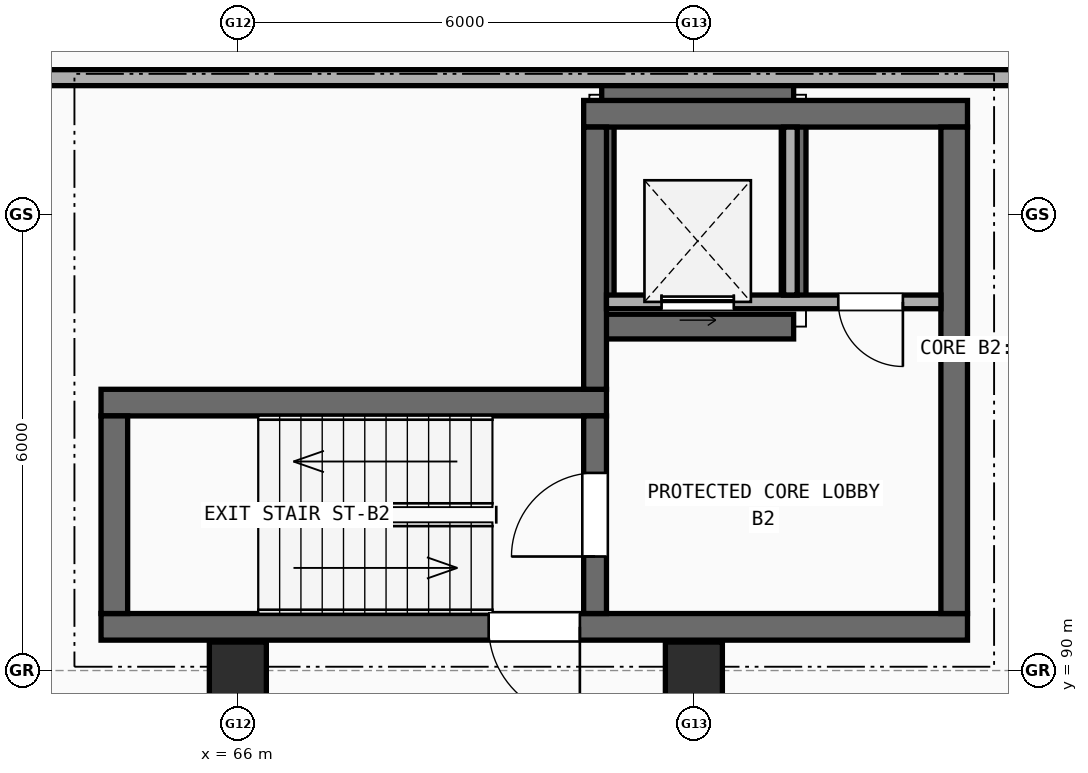
"""IFC4 building model, lengths in metres.
Left out: names, types, materials, properties, quantities, classifications, styles, units other than length and angle.
Written with IfcOpenShell. Run it as: python <this file> out.ifc"""

import sys

from ifc_helpers import new_model, si_unit, direction, frame, frame_2d, origin, origin_2d, place, context, subcontext, project, spatial, rectangle, extrude, element, fill, save


model = new_model("IFC4")
c1 = context("Model", 3, precision=1e-05, world=origin(), true_north=direction((0.0, 1.0)))
c2 = subcontext(c1, "Body", "Model", "MODEL_VIEW")
j1 = project(units=[si_unit("LENGTHUNIT", "METRE"), si_unit("PLANEANGLEUNIT", "RADIAN")], contexts=[c1])
p1 = place(None, origin())
s1 = spatial("IfcSite", under=j1, at=p1, CompositionType="ELEMENT")
p2 = place(p1, origin())
s2 = spatial("IfcBuilding", under=s1, at=p2, CompositionType="ELEMENT")
p3 = place(p2, frame((0.0, 0.0, -4.5)))
s3 = spatial("IfcBuildingStorey", under=s2, at=p3, CompositionType="ELEMENT", Elevation=-4.5)
p4 = place(p3, frame((70.788, 94.525, -1.1), z_axis=(0.0, 0.0, 1.0), x_axis=(1.0, 0.0, 0.0)))
e1 = element("IfcWall", 1, at=p4, inside=s3, PredefinedType="SHEAR", context=c2, shape_type="SweptSolid", body=[
    extrude(rectangle(XDim=2.525, YDim=0.325, at=frame_2d((1.262, 0.0))), origin(), (0.0, 0.0, 1.0), 1.1),
])
p5 = place(p3, frame((73.312, 94.85, -1.1), z_axis=(0.0, 0.0, 1.0), x_axis=(0.0, 1.0, 0.0)))
e2 = element("IfcWall", 2, at=p5, inside=s3, PredefinedType="SHEAR", context=c2, shape_type="SweptSolid", body=[
    extrude(rectangle(XDim=2.4, YDim=0.325, at=frame_2d((1.2, 0.0))), origin(), (0.0, 0.0, 1.0), 1.1),
])
p6 = place(p3, frame((73.312, 97.575, -1.1), z_axis=(0.0, 0.0, 1.0), x_axis=(-1.0, 0.0, 0.0)))
e3 = element("IfcWall", 3, at=p6, inside=s3, PredefinedType="SHEAR", context=c2, shape_type="SweptSolid", body=[
    extrude(rectangle(XDim=2.525, YDim=0.325, at=frame_2d((1.262, 0.0))), origin(), (0.0, 0.0, 1.0), 1.1),
])
p7 = place(p3, frame((70.788, 97.25, -1.1), z_axis=(0.0, 0.0, 1.0), x_axis=(0.0, -1.0, 0.0)))
e4 = element("IfcWall", 4, at=p7, inside=s3, PredefinedType="SHEAR", context=c2, shape_type="SweptSolid", body=[
    extrude(rectangle(XDim=2.4, YDim=0.325, at=frame_2d((1.2, 0.0))), origin(), (0.0, 0.0, 1.0), 1.1),
])
for number, where, z_axis, x_axis in (
    (5, (66.0, 90.0, 0.0), (0.0, 0.0, 1.0), (1.0, 0.0, 0.0)),
    (6, (72.0, 90.0, 0.0), (0.0, 0.0, 1.0), (1.0, 0.0, 0.0)),
):
    element("IfcColumn", number, at=place(p3, frame(where, z_axis=z_axis, x_axis=x_axis)), inside=s3, PredefinedType="COLUMN", context=c2, shape_type="SweptSolid", body=[
        extrude(rectangle(XDim=0.75, YDim=0.75, at=origin_2d()), origin(), (0.0, 0.0, 1.0), 4.215),
    ])
p8 = place(p3, frame((64.2, 90.575, 0.0), z_axis=(0.0, 0.0, 1.0), x_axis=(1.0, 0.0, 0.0)))
e7 = element("IfcWall", 7, at=p8, inside=s3, PredefinedType="SHEAR", context=c2, shape_type="SweptSolid", body=[
    extrude(rectangle(XDim=11.4, YDim=0.35, at=frame_2d((5.7, 0.0))), origin(), (0.0, 0.0, 1.0), 4.215),
])
p9 = place(p8, frame((5.1, 0.0, 0.0)))
e8 = element("IfcOpeningElement", 8, at=p9, cuts=e7, PredefinedType="OPENING", context=c2, shape_type="SweptSolid", body=[
    extrude(rectangle(XDim=1.2, YDim=2.15, at=frame_2d((0.6, 1.075))), frame((0.0, 0.185, 0.0), z_axis=(0.0, -1.0, 0.0), x_axis=(1.0, 0.0, 0.0)), (0.0, 0.0, 1.0), 0.37),
])
p10 = place(p3, frame((70.85, 93.525, 0.0), z_axis=(0.0, 0.0, 1.0), x_axis=(-1.0, 0.0, 0.0)))
e9 = element("IfcWall", 9, at=p10, inside=s3, PredefinedType="SHEAR", context=c2, shape_type="SweptSolid", body=[
    extrude(rectangle(XDim=6.65, YDim=0.35, at=frame_2d((3.325, 0.0))), origin(), (0.0, 0.0, 1.0), 4.215),
])
p11 = place(p3, frame((64.375, 93.35, 0.0), z_axis=(0.0, 0.0, 1.0), x_axis=(0.0, -1.0, 0.0)))
e10 = element("IfcWall", 10, at=p11, inside=s3, PredefinedType="SHEAR", context=c2, shape_type="SweptSolid", body=[
    extrude(rectangle(XDim=2.6, YDim=0.35, at=frame_2d((1.3, 0.0))), origin(), (0.0, 0.0, 1.0), 4.215),
])
p12 = place(p3, frame((70.7, 90.75, 0.0), z_axis=(0.0, 0.0, 1.0), x_axis=(0.0, 1.0, 0.0)))
e11 = element("IfcWall", 11, at=p12, inside=s3, PredefinedType="SHEAR", context=c2, shape_type="SweptSolid", body=[
    extrude(rectangle(XDim=2.6, YDim=0.3, at=frame_2d((1.3, 0.0))), origin(), (0.0, 0.0, 1.0), 4.215),
])
p13 = place(p12, frame((0.75, 0.0, 0.0)))
e12 = element("IfcOpeningElement", 12, at=p13, cuts=e11, PredefinedType="OPENING", context=c2, shape_type="SweptSolid", body=[
    extrude(rectangle(XDim=1.1, YDim=2.15, at=frame_2d((0.55, 1.075))), frame((0.0, 0.16, 0.0), z_axis=(0.0, -1.0, 0.0), x_axis=(1.0, 0.0, 0.0)), (0.0, 0.0, 1.0), 0.32),
])
p14 = place(p3, frame((75.6, 97.325, 0.0), z_axis=(0.0, 0.0, 1.0), x_axis=(-1.0, 0.0, 0.0)))
e13 = element("IfcWall", 13, at=p14, inside=s3, PredefinedType="SHEAR", context=c2, shape_type="SweptSolid", body=[
    extrude(rectangle(XDim=5.05, YDim=0.35, at=frame_2d((2.525, 0.0))), origin(), (0.0, 0.0, 1.0), 4.215),
])
p15 = place(p3, frame((75.425, 90.75, 0.0), z_axis=(0.0, 0.0, 1.0), x_axis=(0.0, 1.0, 0.0)))
e14 = element("IfcWall", 14, at=p15, inside=s3, PredefinedType="SHEAR", context=c2, shape_type="SweptSolid", body=[
    extrude(rectangle(XDim=6.4, YDim=0.35, at=frame_2d((3.2, 0.0))), origin(), (0.0, 0.0, 1.0), 4.215),
])
p16 = place(p3, frame((70.7, 93.7, 0.0), z_axis=(0.0, 0.0, 1.0), x_axis=(0.0, 1.0, 0.0)))
e15 = element("IfcWall", 15, at=p16, inside=s3, PredefinedType="SHEAR", context=c2, shape_type="SweptSolid", body=[
    extrude(rectangle(XDim=3.45, YDim=0.3, at=frame_2d((1.725, 0.0))), origin(), (0.0, 0.0, 1.0), 4.215),
])
p17 = place(p3, frame((70.85, 94.85, 0.0), z_axis=(0.0, 0.0, 1.0), x_axis=(1.0, 0.0, 0.0)))
e16 = element("IfcWall", 16, at=p17, inside=s3, PredefinedType="SOLIDWALL", context=c2, shape_type="SweptSolid", body=[
    extrude(rectangle(XDim=4.4, YDim=0.18, at=frame_2d((2.2, 0.0))), origin(), (0.0, 0.0, 1.0), 4.215),
])
p18 = place(p17, frame((0.725, 0.0, 0.0)))
e17 = element("IfcOpeningElement", 17, at=p18, cuts=e16, PredefinedType="OPENING", context=c2, shape_type="SweptSolid", body=[
    extrude(rectangle(XDim=0.95, YDim=2.15, at=frame_2d((0.475, 1.075))), frame((0.0, 0.1, 0.0), z_axis=(0.0, -1.0, 0.0), x_axis=(1.0, 0.0, 0.0)), (0.0, 0.0, 1.0), 0.2),
])
p19 = place(p17, frame((3.05, 0.0, 0.0)))
e18 = element("IfcOpeningElement", 18, at=p19, cuts=e16, PredefinedType="OPENING", context=c2, shape_type="SweptSolid", body=[
    extrude(rectangle(XDim=0.85, YDim=2.1, at=frame_2d((0.425, 1.05))), frame((0.0, 0.1, 0.0), z_axis=(0.0, -1.0, 0.0), x_axis=(1.0, 0.0, 0.0)), (0.0, 0.0, 1.0), 0.2),
])
p20 = place(p3, frame((73.27, 94.94, 0.0), z_axis=(0.0, 0.0, 1.0), x_axis=(0.0, 1.0, 0.0)))
e19 = element("IfcWall", 19, at=p20, inside=s3, PredefinedType="SOLIDWALL", context=c2, shape_type="SweptSolid", body=[
    extrude(rectangle(XDim=2.21, YDim=0.18, at=frame_2d((1.105, 0.0))), origin(), (0.0, 0.0, 1.0), 4.215),
])
p21 = place(p3, frame((50.14, 97.8, 0.0), z_axis=(0.0, 0.0, 1.0), x_axis=(1.0, 0.0, 0.0)))
e20 = element("IfcWall", 20, at=p21, inside=s3, PredefinedType="SOLIDWALL", context=c2, shape_type="SweptSolid", body=[
    extrude(rectangle(XDim=32.32, YDim=0.21, at=frame_2d((16.16, 0.0))), origin(), (0.0, 0.0, 1.0), 2.897),
])
p22 = place(p9, origin())
e21 = element("IfcDoor", 21, at=p22, inside=s3, OperationType="SINGLE_SWING_RIGHT", PredefinedType="DOOR", context=c2, shape_type="SweptSolid", body=[
    extrude(rectangle(XDim=1.2, YDim=2.15, at=frame_2d((0.6, 1.075))), frame((0.0, 0.025, 0.0), z_axis=(0.0, -1.0, 0.0), x_axis=(1.0, 0.0, 0.0)), (0.0, 0.0, 1.0), 0.05),
])
fill(e8, e21)
p23 = place(p13, origin())
e22 = element("IfcDoor", 22, at=p23, inside=s3, OperationType="SINGLE_SWING_LEFT", PredefinedType="DOOR", context=c2, shape_type="SweptSolid", body=[
    extrude(rectangle(XDim=1.1, YDim=2.15, at=frame_2d((0.55, 1.075))), frame((0.0, 0.025, 0.0), z_axis=(0.0, -1.0, 0.0), x_axis=(1.0, 0.0, 0.0)), (0.0, 0.0, 1.0), 0.05),
])
fill(e12, e22)
p24 = place(p18, origin())
e23 = element("IfcDoor", 23, at=p24, inside=s3, OperationType="SLIDING_TO_LEFT", PredefinedType="DOOR", context=c2, shape_type="SweptSolid", body=[
    extrude(rectangle(XDim=0.95, YDim=2.15, at=frame_2d((0.475, 1.075))), frame((0.0, 0.025, 0.0), z_axis=(0.0, -1.0, 0.0), x_axis=(1.0, 0.0, 0.0)), (0.0, 0.0, 1.0), 0.05),
])
fill(e17, e23)
p25 = place(p19, frame((0.85, 0.0, 0.0), z_axis=(0.0, 0.0, 1.0), x_axis=(-1.0, 0.0, 0.0)))
e24 = element("IfcDoor", 24, at=p25, inside=s3, OperationType="SINGLE_SWING_RIGHT", PredefinedType="DOOR", context=c2, shape_type="SweptSolid", body=[
    extrude(rectangle(XDim=0.85, YDim=2.1, at=frame_2d((0.425, 1.05))), frame((0.0, 0.025, 0.0), z_axis=(0.0, -1.0, 0.0), x_axis=(1.0, 0.0, 0.0)), (0.0, 0.0, 1.0), 0.05),
])
fill(e18, e24)
save(model, sys.argv[1])
